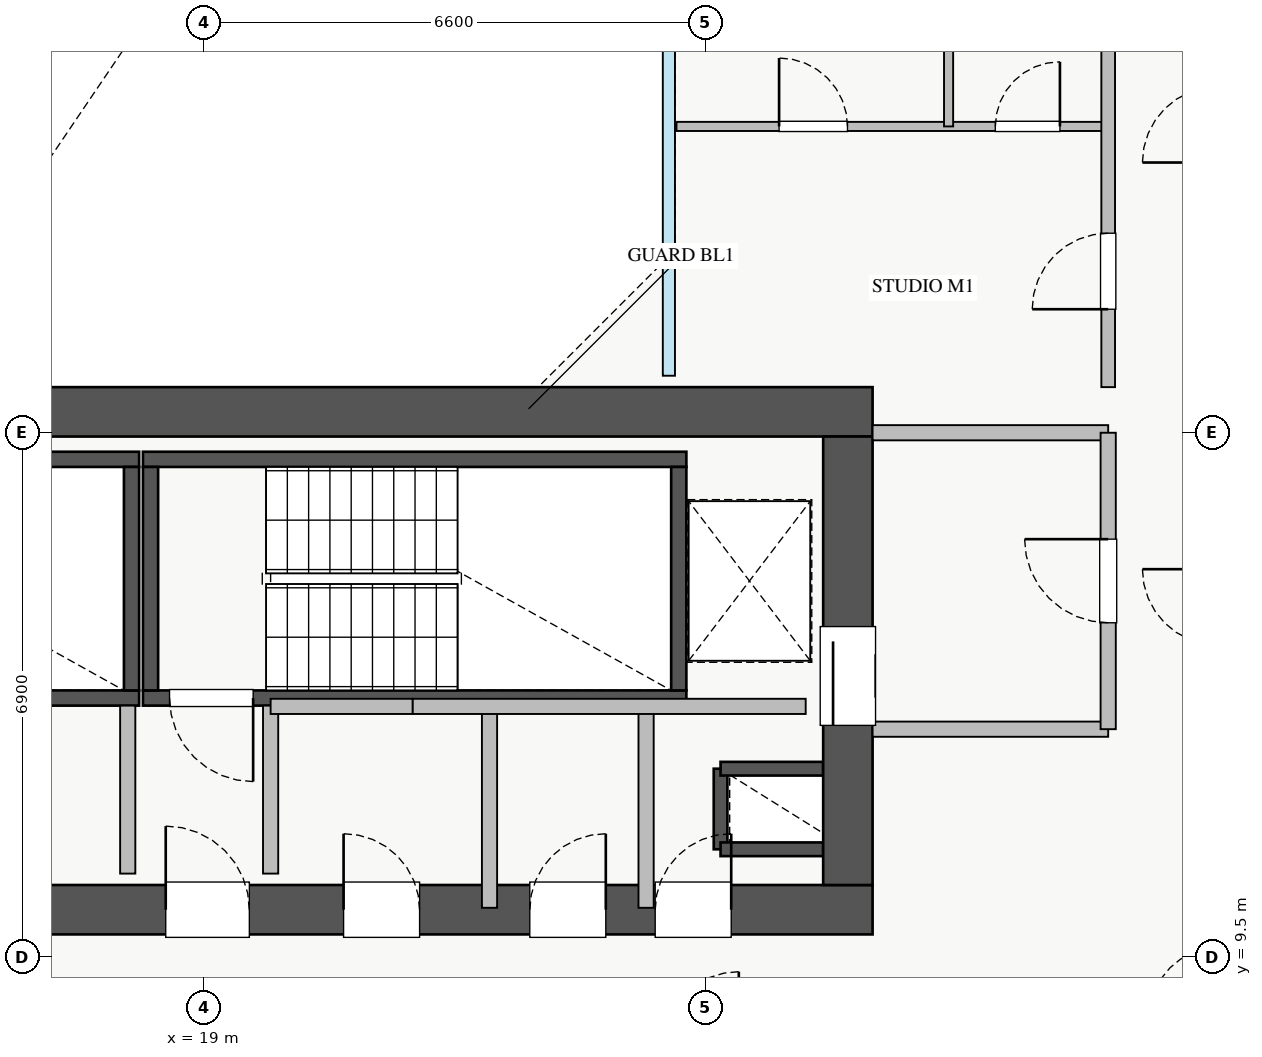
"""IFC4 building model, lengths in metres.
Left out: names, types, materials, properties, quantities, classifications, styles, units other than length and angle.
Written with IfcOpenShell. Run it as: python <this file> out.ifc"""

import sys

from ifc_helpers import new_model, si_unit, direction, frame, frame_2d, origin, place, context, subcontext, project, spatial, rectangle, extrude, source, transform, mapped, element, fill, save


model = new_model("IFC4")
c1 = context("Model", 3, precision=1e-05, world=origin(), true_north=direction((0.0, 1.0)))
c2 = subcontext(c1, "Body", "Model", "MODEL_VIEW")
j1 = project(units=[si_unit("LENGTHUNIT", "METRE"), si_unit("PLANEANGLEUNIT", "RADIAN")], contexts=[c1])
p1 = place(None, origin())
s1 = spatial("IfcSite", under=j1, at=p1, CompositionType="ELEMENT")
p2 = place(p1, origin())
s2 = spatial("IfcBuilding", under=s1, at=p2, CompositionType="ELEMENT")
p3 = place(p2, frame((0.0, 0.0, 129.5)))
s3 = spatial("IfcBuildingStorey", under=s2, at=p3, CompositionType="ELEMENT", Elevation=129.5)
p4 = place(p3, frame((25.8, 10.92, 0.0), z_axis=(0.0, 0.0, 1.0), x_axis=(0.0, 1.0, 0.0)))
e1 = element("IfcWall", 1, at=p4, inside=s3, PredefinedType="SHEAR", context=c2, shape_type="SweptSolid", body=[
    extrude(rectangle(XDim=1.06, YDim=0.18, at=frame_2d((0.53, 0.0))), origin(), (0.0, 0.0, 1.0), 3.07),
])
for number, where, z_axis, x_axis in (
    (2, (25.8, 11.98, 0.0), (0.0, 0.0, 1.0), (1.0, 0.0, 0.0)),
    (3, (25.8, 10.92, 0.0), (0.0, 0.0, 1.0), (1.0, 0.0, 0.0)),
):
    element("IfcWall", number, at=place(p3, frame(where, z_axis=z_axis, x_axis=x_axis)), inside=s3, PredefinedType="SHEAR", context=c2, shape_type="SweptSolid", body=[
        extrude(rectangle(XDim=1.35, YDim=0.18, at=frame_2d((0.675, 0.0))), origin(), (0.0, 0.0, 1.0), 3.07),
    ])
p5 = place(p3, frame((10.85, 12.91, 0.0), z_axis=(0.0, 0.0, 1.0), x_axis=(1.0, 0.0, 0.0)))
e4 = element("IfcWall", 4, at=p5, inside=s3, PredefinedType="SHEAR", context=c2, shape_type="SweptSolid", body=[
    extrude(rectangle(XDim=7.3, YDim=0.2, at=frame_2d((3.65, 0.0))), origin(), (0.0, 0.0, 1.0), 3.25),
])
p6 = place(p5, frame((0.35, 0.0, 0.0)))
e5 = element("IfcOpeningElement", 5, at=p6, cuts=e4, PredefinedType="OPENING", context=c2, shape_type="SweptSolid", body=[
    extrude(rectangle(XDim=1.1, YDim=2.05, at=frame_2d((0.55, 1.025))), frame((0.0, 0.11, 0.0), z_axis=(0.0, -1.0, 0.0), x_axis=(1.0, 0.0, 0.0)), (0.0, 0.0, 1.0), 0.22),
])
p7 = place(p3, frame((10.85, 16.05, 0.0), z_axis=(0.0, 0.0, 1.0), x_axis=(1.0, 0.0, 0.0)))
e6 = element("IfcWall", 6, at=p7, inside=s3, PredefinedType="SHEAR", context=c2, shape_type="SweptSolid", body=[
    extrude(rectangle(XDim=7.3, YDim=0.2, at=frame_2d((3.65, 0.0))), origin(), (0.0, 0.0, 1.0), 3.25),
])
p8 = place(p3, frame((18.05, 13.01, 0.0), z_axis=(0.0, 0.0, 1.0), x_axis=(0.0, 1.0, 0.0)))
e7 = element("IfcWall", 7, at=p8, inside=s3, PredefinedType="SHEAR", context=c2, shape_type="SweptSolid", body=[
    extrude(rectangle(XDim=2.94, YDim=0.2, at=frame_2d((1.47, 0.0))), origin(), (0.0, 0.0, 1.0), 3.25),
])
p9 = place(p3, frame((18.2, 12.91, 0.0), z_axis=(0.0, 0.0, 1.0), x_axis=(1.0, 0.0, 0.0)))
e8 = element("IfcWall", 8, at=p9, inside=s3, PredefinedType="SHEAR", context=c2, shape_type="SweptSolid", body=[
    extrude(rectangle(XDim=7.15, YDim=0.2, at=frame_2d((3.575, 0.0))), origin(), (0.0, 0.0, 1.0), 3.25),
])
p10 = place(p9, frame((0.35, 0.0, 0.0)))
e9 = element("IfcOpeningElement", 9, at=p10, cuts=e8, PredefinedType="OPENING", context=c2, shape_type="SweptSolid", body=[
    extrude(rectangle(XDim=1.1, YDim=2.05, at=frame_2d((0.55, 1.025))), frame((0.0, 0.11, 0.0), z_axis=(0.0, -1.0, 0.0), x_axis=(1.0, 0.0, 0.0)), (0.0, 0.0, 1.0), 0.22),
])
p11 = place(p3, frame((18.2, 16.05, 0.0), z_axis=(0.0, 0.0, 1.0), x_axis=(1.0, 0.0, 0.0)))
e10 = element("IfcWall", 10, at=p11, inside=s3, PredefinedType="SHEAR", context=c2, shape_type="SweptSolid", body=[
    extrude(rectangle(XDim=7.15, YDim=0.2, at=frame_2d((3.575, 0.0))), origin(), (0.0, 0.0, 1.0), 3.25),
])
for number, where, z_axis, x_axis in (
    (11, (18.3, 13.01, 0.0), (0.0, 0.0, 1.0), (0.0, 1.0, 0.0)),
    (12, (25.25, 13.01, 0.0), (0.0, 0.0, 1.0), (0.0, 1.0, 0.0)),
):
    element("IfcWall", number, at=place(p3, frame(where, z_axis=z_axis, x_axis=x_axis)), inside=s3, PredefinedType="SHEAR", context=c2, shape_type="SweptSolid", body=[
        extrude(rectangle(XDim=2.94, YDim=0.2, at=frame_2d((1.47, 0.0))), origin(), (0.0, 0.0, 1.0), 3.25),
    ])
p12 = place(p3, frame((10.2, 10.125, 0.0), z_axis=(0.0, 0.0, 1.0), x_axis=(1.0, 0.0, 0.0)))
e13 = element("IfcWall", 13, at=p12, inside=s3, PredefinedType="SHEAR", context=c2, shape_type="SweptSolid", body=[
    extrude(rectangle(XDim=17.6, YDim=0.65, at=frame_2d((8.8, 0.0))), origin(), (0.0, 0.0, 1.0), 3.25),
])
p13 = place(p12, frame((1.15, 0.0, 0.0)))
e14 = element("IfcOpeningElement", 14, at=p13, cuts=e13, PredefinedType="OPENING", context=c2, shape_type="SweptSolid", body=[
    extrude(rectangle(XDim=1.1, YDim=2.05, at=frame_2d((0.55, 1.025))), frame((0.0, 0.335, 0.0), z_axis=(0.0, -1.0, 0.0), x_axis=(1.0, 0.0, 0.0)), (0.0, 0.0, 1.0), 0.67),
])
p14 = place(p12, frame((8.3, 0.0, 0.0)))
e15 = element("IfcOpeningElement", 15, at=p14, cuts=e13, PredefinedType="OPENING", context=c2, shape_type="SweptSolid", body=[
    extrude(rectangle(XDim=1.1, YDim=2.05, at=frame_2d((0.55, 1.025))), frame((0.0, 0.335, 0.0), z_axis=(0.0, -1.0, 0.0), x_axis=(1.0, 0.0, 0.0)), (0.0, 0.0, 1.0), 0.67),
])
p15 = place(p12, frame((4.9, 0.0, 0.0)))
e16 = element("IfcOpeningElement", 16, at=p15, cuts=e13, PredefinedType="OPENING", context=c2, shape_type="SweptSolid", body=[
    extrude(rectangle(XDim=1.1, YDim=2.05, at=frame_2d((0.55, 1.025))), frame((0.0, 0.335, 0.0), z_axis=(0.0, -1.0, 0.0), x_axis=(1.0, 0.0, 0.0)), (0.0, 0.0, 1.0), 0.67),
])
p16 = place(p12, frame((14.74, 0.0, 0.0)))
e17 = element("IfcOpeningElement", 17, at=p16, cuts=e13, PredefinedType="OPENING", context=c2, shape_type="SweptSolid", body=[
    extrude(rectangle(XDim=1.0, YDim=2.05, at=frame_2d((0.5, 1.025))), frame((0.0, 0.335, 0.0), z_axis=(0.0, -1.0, 0.0), x_axis=(1.0, 0.0, 0.0)), (0.0, 0.0, 1.0), 0.67),
])
p17 = place(p12, frame((10.64, 0.0, 0.0)))
e18 = element("IfcOpeningElement", 18, at=p17, cuts=e13, PredefinedType="OPENING", context=c2, shape_type="SweptSolid", body=[
    extrude(rectangle(XDim=1.0, YDim=2.05, at=frame_2d((0.5, 1.025))), frame((0.0, 0.335, 0.0), z_axis=(0.0, -1.0, 0.0), x_axis=(1.0, 0.0, 0.0)), (0.0, 0.0, 1.0), 0.67),
])
p18 = place(p12, frame((13.09, 0.0, 0.0)))
e19 = element("IfcOpeningElement", 19, at=p18, cuts=e13, PredefinedType="OPENING", context=c2, shape_type="SweptSolid", body=[
    extrude(rectangle(XDim=1.0, YDim=2.05, at=frame_2d((0.5, 1.025))), frame((0.0, 0.335, 0.0), z_axis=(0.0, -1.0, 0.0), x_axis=(1.0, 0.0, 0.0)), (0.0, 0.0, 1.0), 0.67),
])
p19 = place(p3, frame((10.2, 16.675, 0.0), z_axis=(0.0, 0.0, 1.0), x_axis=(1.0, 0.0, 0.0)))
e20 = element("IfcWall", 20, at=p19, inside=s3, PredefinedType="SHEAR", context=c2, shape_type="SweptSolid", body=[
    extrude(rectangle(XDim=17.6, YDim=0.65, at=frame_2d((8.8, 0.0))), origin(), (0.0, 0.0, 1.0), 3.25),
])
p20 = place(p3, frame((27.475, 10.45, 0.0), z_axis=(0.0, 0.0, 1.0), x_axis=(0.0, 1.0, 0.0)))
e21 = element("IfcWall", 21, at=p20, inside=s3, PredefinedType="SHEAR", context=c2, shape_type="SweptSolid", body=[
    extrude(rectangle(XDim=5.9, YDim=0.65, at=frame_2d((2.95, 0.0))), origin(), (0.0, 0.0, 1.0), 3.25),
])
p21 = place(p20, frame((2.1, 0.0, 0.0)))
e22 = element("IfcOpeningElement", 22, at=p21, cuts=e21, PredefinedType="OPENING", context=c2, shape_type="SweptSolid", body=[
    extrude(rectangle(XDim=1.3, YDim=2.05, at=frame_2d((0.65, 1.025))), frame((0.0, 0.335, 0.0), z_axis=(0.0, -1.0, 0.0), x_axis=(1.0, 0.0, 0.0)), (0.0, 0.0, 1.0), 0.67),
])
for number, where, z_axis, x_axis in (
    (23, (27.8, 16.4, 0.0), (0.0, 0.0, 1.0), (1.0, 0.0, 0.0)),
    (24, (27.8, 12.5, 0.0), (0.0, 0.0, 1.0), (1.0, 0.0, 0.0)),
):
    element("IfcWall", number, at=place(p3, frame(where, z_axis=z_axis, x_axis=x_axis)), inside=s3, PredefinedType="PARTITIONING", context=c2, shape_type="SweptSolid", body=[
        extrude(rectangle(XDim=3.1, YDim=0.2, at=frame_2d((1.55, 0.0))), origin(), (0.0, 0.0, 1.0), 3.07),
    ])
p22 = place(p3, frame((30.9, 12.5, 0.0), z_axis=(0.0, 0.0, 1.0), x_axis=(0.0, 1.0, 0.0)))
e25 = element("IfcWall", 25, at=p22, inside=s3, PredefinedType="PARTITIONING", context=c2, shape_type="SweptSolid", body=[
    extrude(rectangle(XDim=3.9, YDim=0.2, at=frame_2d((1.95, 0.0))), origin(), (0.0, 0.0, 1.0), 3.07),
])
p23 = place(p22, frame((1.4, 0.0, 0.0)))
e26 = element("IfcOpeningElement", 26, at=p23, cuts=e25, PredefinedType="OPENING", context=c2, shape_type="SweptSolid", body=[
    extrude(rectangle(XDim=1.1, YDim=2.05, at=frame_2d((0.55, 1.025))), frame((0.0, 0.11, 0.0), z_axis=(0.0, -1.0, 0.0), x_axis=(1.0, 0.0, 0.0)), (0.0, 0.0, 1.0), 0.22),
])
for number, where, z_axis, x_axis in (
    (27, (18.0, 10.6, 0.0), (0.0, 0.0, 1.0), (0.0, 1.0, 0.0)),
    (28, (19.88, 10.6, 0.0), (0.0, 0.0, 1.0), (0.0, 1.0, 0.0)),
):
    element("IfcWall", number, at=place(p3, frame(where, z_axis=z_axis, x_axis=x_axis)), inside=s3, PredefinedType="PARTITIONING", context=c2, shape_type="SweptSolid", body=[
        extrude(rectangle(XDim=2.21, YDim=0.2, at=frame_2d((1.105, 0.0))), origin(), (0.0, 0.0, 1.0), 3.07),
    ])
p24 = place(p3, frame((24.82, 10.15, 0.0), z_axis=(0.0, 0.0, 1.0), x_axis=(0.0, 1.0, 0.0)))
e29 = element("IfcWall", 29, at=p24, inside=s3, PredefinedType="PARTITIONING", context=c2, shape_type="SweptSolid", body=[
    extrude(rectangle(XDim=2.65, YDim=0.2, at=frame_2d((1.325, 0.0))), origin(), (0.0, 0.0, 1.0), 3.07),
])
p25 = place(p3, frame((19.88, 12.8, 0.0), z_axis=(0.0, 0.0, 1.0), x_axis=(1.0, 0.0, 0.0)))
e30 = element("IfcWall", 30, at=p25, inside=s3, PredefinedType="PARTITIONING", context=c2, shape_type="SweptSolid", body=[
    extrude(rectangle(XDim=1.87, YDim=0.2, at=frame_2d((0.935, 0.0))), origin(), (0.0, 0.0, 1.0), 3.07),
])
p26 = place(p3, frame((22.76, 10.15, 0.0), z_axis=(0.0, 0.0, 1.0), x_axis=(0.0, 1.0, 0.0)))
e31 = element("IfcWall", 31, at=p26, inside=s3, PredefinedType="PARTITIONING", context=c2, shape_type="SweptSolid", body=[
    extrude(rectangle(XDim=2.65, YDim=0.2, at=frame_2d((1.325, 0.0))), origin(), (0.0, 0.0, 1.0), 3.07),
])
p27 = place(p3, frame((21.75, 12.8, 0.0), z_axis=(0.0, 0.0, 1.0), x_axis=(1.0, 0.0, 0.0)))
e32 = element("IfcWall", 32, at=p27, inside=s3, PredefinedType="PARTITIONING", context=c2, shape_type="SweptSolid", body=[
    extrude(rectangle(XDim=5.17, YDim=0.2, at=frame_2d((2.585, 0.0))), origin(), (0.0, 0.0, 1.0), 3.07),
])
p28 = place(p3, frame((25.22, 20.43, 0.0), z_axis=(0.0, 0.0, 1.0), x_axis=(1.0, 0.0, 0.0)))
e33 = element("IfcWall", 33, at=p28, inside=s3, PredefinedType="PLUMBINGWALL", context=c2, shape_type="SweptSolid", body=[
    extrude(rectangle(XDim=5.68, YDim=0.12, at=frame_2d((2.84, 0.0))), origin(), (0.0, 0.0, 1.0), 3.07),
])
p29 = place(p28, frame((1.35, 0.0, 0.0)))
e34 = element("IfcOpeningElement", 34, at=p29, cuts=e33, PredefinedType="OPENING", context=c2, shape_type="SweptSolid", body=[
    extrude(rectangle(XDim=0.9, YDim=2.05, at=frame_2d((0.45, 1.025))), frame((0.0, 0.07, 0.0), z_axis=(0.0, -1.0, 0.0), x_axis=(1.0, 0.0, 0.0)), (0.0, 0.0, 1.0), 0.14),
])
p30 = place(p28, frame((4.195, 0.0, 0.0)))
e35 = element("IfcOpeningElement", 35, at=p30, cuts=e33, PredefinedType="OPENING", context=c2, shape_type="SweptSolid", body=[
    extrude(rectangle(XDim=0.85, YDim=2.05, at=frame_2d((0.425, 1.025))), frame((0.0, 0.07, 0.0), z_axis=(0.0, -1.0, 0.0), x_axis=(1.0, 0.0, 0.0)), (0.0, 0.0, 1.0), 0.14),
])
p31 = place(p3, frame((28.8, 20.43, 0.0), z_axis=(0.0, 0.0, 1.0), x_axis=(0.0, 1.0, 0.0)))
e36 = element("IfcWall", 36, at=p31, inside=s3, PredefinedType="PLUMBINGWALL", context=c2, shape_type="SweptSolid", body=[
    extrude(rectangle(XDim=2.92, YDim=0.12, at=frame_2d((1.46, 0.0))), origin(), (0.0, 0.0, 1.0), 3.07),
])
p32 = place(p3, frame((30.9, 17.0, 0.0), z_axis=(0.0, 0.0, 1.0), x_axis=(0.0, 1.0, 0.0)))
e37 = element("IfcWall", 37, at=p32, inside=s3, PredefinedType="PARTITIONING", context=c2, shape_type="SweptSolid", body=[
    extrude(rectangle(XDim=12.0, YDim=0.18, at=frame_2d((6.0, 0.0))), origin(), (0.0, 0.0, 1.0), 3.07),
])
p33 = place(p32, frame((1.025, 0.0, 0.0)))
e38 = element("IfcOpeningElement", 38, at=p33, cuts=e37, PredefinedType="OPENING", context=c2, shape_type="SweptSolid", body=[
    extrude(rectangle(XDim=1.0, YDim=2.05, at=frame_2d((0.5, 1.025))), frame((0.0, 0.1, 0.0), z_axis=(0.0, -1.0, 0.0), x_axis=(1.0, 0.0, 0.0)), (0.0, 0.0, 1.0), 0.2),
])
p34 = place(p32, frame((7.185, 0.0, 0.0)))
e39 = element("IfcOpeningElement", 39, at=p34, cuts=e37, PredefinedType="OPENING", context=c2, shape_type="SweptSolid", body=[
    extrude(rectangle(XDim=1.0, YDim=2.05, at=frame_2d((0.5, 1.025))), frame((0.0, 0.1, 0.0), z_axis=(0.0, -1.0, 0.0), x_axis=(1.0, 0.0, 0.0)), (0.0, 0.0, 1.0), 0.2),
])
m1 = source(origin(), c2, "Body", "SweptSolid", [
    extrude(rectangle(XDim=1.3, YDim=2.05, at=frame_2d((0.65, 1.025))), frame((0.0, 0.025, 0.0), z_axis=(0.0, -1.0, 0.0), x_axis=(1.0, 0.0, 0.0)), (0.0, 0.0, 1.0), 0.05),
])
p35 = place(p21, origin())
e40 = element("IfcDoor", 40, at=p35, inside=s3, OperationType="SLIDING_TO_RIGHT", PredefinedType="DOOR", context=c2, shape_type="MappedRepresentation", body=[
    mapped(m1, transform((0.0, 0.0, 0.0), x_axis=(1.0, 0.0, 0.0), y_axis=(0.0, 1.0, 0.0), z_axis=(0.0, 0.0, 1.0), scale=1.0)),
])
fill(e22, e40)
m2 = source(origin(), c2, "Body", "SweptSolid", [
    extrude(rectangle(XDim=1.1, YDim=2.05, at=frame_2d((0.55, 1.025))), frame((0.0, 0.025, 0.0), z_axis=(0.0, -1.0, 0.0), x_axis=(1.0, 0.0, 0.0)), (0.0, 0.0, 1.0), 0.05),
])
p36 = place(p14, origin())
e41 = element("IfcDoor", 41, at=p36, inside=s3, OperationType="SINGLE_SWING_LEFT", PredefinedType="DOOR", context=c2, shape_type="MappedRepresentation", body=[
    mapped(m2, transform((0.0, 0.0, 0.0), x_axis=(1.0, 0.0, 0.0), y_axis=(0.0, 1.0, 0.0), z_axis=(0.0, 0.0, 1.0), scale=1.0)),
])
fill(e15, e41)
p37 = place(p10, frame((1.1, 0.0, 0.0), z_axis=(0.0, 0.0, 1.0), x_axis=(-1.0, 0.0, 0.0)))
e42 = element("IfcDoor", 42, at=p37, inside=s3, OperationType="SINGLE_SWING_RIGHT", PredefinedType="DOOR", context=c2, shape_type="MappedRepresentation", body=[
    mapped(m2, transform((0.0, 0.0, 0.0), x_axis=(1.0, 0.0, 0.0), y_axis=(0.0, 1.0, 0.0), z_axis=(0.0, 0.0, 1.0), scale=1.0)),
])
fill(e9, e42)
m3 = source(origin(), c2, "Body", "SweptSolid", [
    extrude(rectangle(XDim=1.0, YDim=2.05, at=frame_2d((0.5, 1.025))), frame((0.0, 0.025, 0.0), z_axis=(0.0, -1.0, 0.0), x_axis=(1.0, 0.0, 0.0)), (0.0, 0.0, 1.0), 0.05),
])
p38 = place(p16, origin())
e43 = element("IfcDoor", 43, at=p38, inside=s3, OperationType="SINGLE_SWING_RIGHT", PredefinedType="DOOR", context=c2, shape_type="MappedRepresentation", body=[
    mapped(m3, transform((0.0, 0.0, 0.0), x_axis=(1.0, 0.0, 0.0), y_axis=(0.0, 1.0, 0.0), z_axis=(0.0, 0.0, 1.0), scale=1.0)),
])
fill(e17, e43)
p39 = place(p17, origin())
e44 = element("IfcDoor", 44, at=p39, inside=s3, OperationType="SINGLE_SWING_LEFT", PredefinedType="DOOR", context=c2, shape_type="MappedRepresentation", body=[
    mapped(m3, transform((0.0, 0.0, 0.0), x_axis=(1.0, 0.0, 0.0), y_axis=(0.0, 1.0, 0.0), z_axis=(0.0, 0.0, 1.0), scale=1.0)),
])
fill(e18, e44)
p40 = place(p18, origin())
e45 = element("IfcDoor", 45, at=p40, inside=s3, OperationType="SINGLE_SWING_RIGHT", PredefinedType="DOOR", context=c2, shape_type="MappedRepresentation", body=[
    mapped(m3, transform((0.0, 0.0, 0.0), x_axis=(1.0, 0.0, 0.0), y_axis=(0.0, 1.0, 0.0), z_axis=(0.0, 0.0, 1.0), scale=1.0)),
])
fill(e19, e45)
p41 = place(p23, origin())
e46 = element("IfcDoor", 46, at=p41, inside=s3, OperationType="SINGLE_SWING_RIGHT", PredefinedType="DOOR", context=c2, shape_type="MappedRepresentation", body=[
    mapped(m2, transform((0.0, 0.0, 0.0), x_axis=(1.0, 0.0, 0.0), y_axis=(0.0, 1.0, 0.0), z_axis=(0.0, 0.0, 1.0), scale=1.0)),
])
fill(e26, e46)
m4 = source(origin(), c2, "Body", "SweptSolid", [
    extrude(rectangle(XDim=0.9, YDim=2.05, at=frame_2d((0.45, 1.025))), frame((0.0, 0.025, 0.0), z_axis=(0.0, -1.0, 0.0), x_axis=(1.0, 0.0, 0.0)), (0.0, 0.0, 1.0), 0.05),
])
p42 = place(p29, origin())
e47 = element("IfcDoor", 47, at=p42, inside=s3, OperationType="SINGLE_SWING_LEFT", PredefinedType="DOOR", context=c2, shape_type="MappedRepresentation", body=[
    mapped(m4, transform((0.0, 0.0, 0.0), x_axis=(1.0, 0.0, 0.0), y_axis=(0.0, 1.0, 0.0), z_axis=(0.0, 0.0, 1.0), scale=1.0)),
])
fill(e34, e47)
m5 = source(origin(), c2, "Body", "SweptSolid", [
    extrude(rectangle(XDim=0.85, YDim=2.05, at=frame_2d((0.425, 1.025))), frame((0.0, 0.025, 0.0), z_axis=(0.0, -1.0, 0.0), x_axis=(1.0, 0.0, 0.0)), (0.0, 0.0, 1.0), 0.05),
])
p43 = place(p30, origin())
e48 = element("IfcDoor", 48, at=p43, inside=s3, OperationType="SINGLE_SWING_RIGHT", PredefinedType="DOOR", context=c2, shape_type="MappedRepresentation", body=[
    mapped(m5, transform((0.0, 0.0, 0.0), x_axis=(1.0, 0.0, 0.0), y_axis=(0.0, 1.0, 0.0), z_axis=(0.0, 0.0, 1.0), scale=1.0)),
])
fill(e35, e48)
p44 = place(p33, origin())
e49 = element("IfcDoor", 49, at=p44, inside=s3, OperationType="SINGLE_SWING_LEFT", PredefinedType="DOOR", context=c2, shape_type="MappedRepresentation", body=[
    mapped(m3, transform((0.0, 0.0, 0.0), x_axis=(1.0, 0.0, 0.0), y_axis=(0.0, 1.0, 0.0), z_axis=(0.0, 0.0, 1.0), scale=1.0)),
])
fill(e38, e49)
save(model, sys.argv[1])
